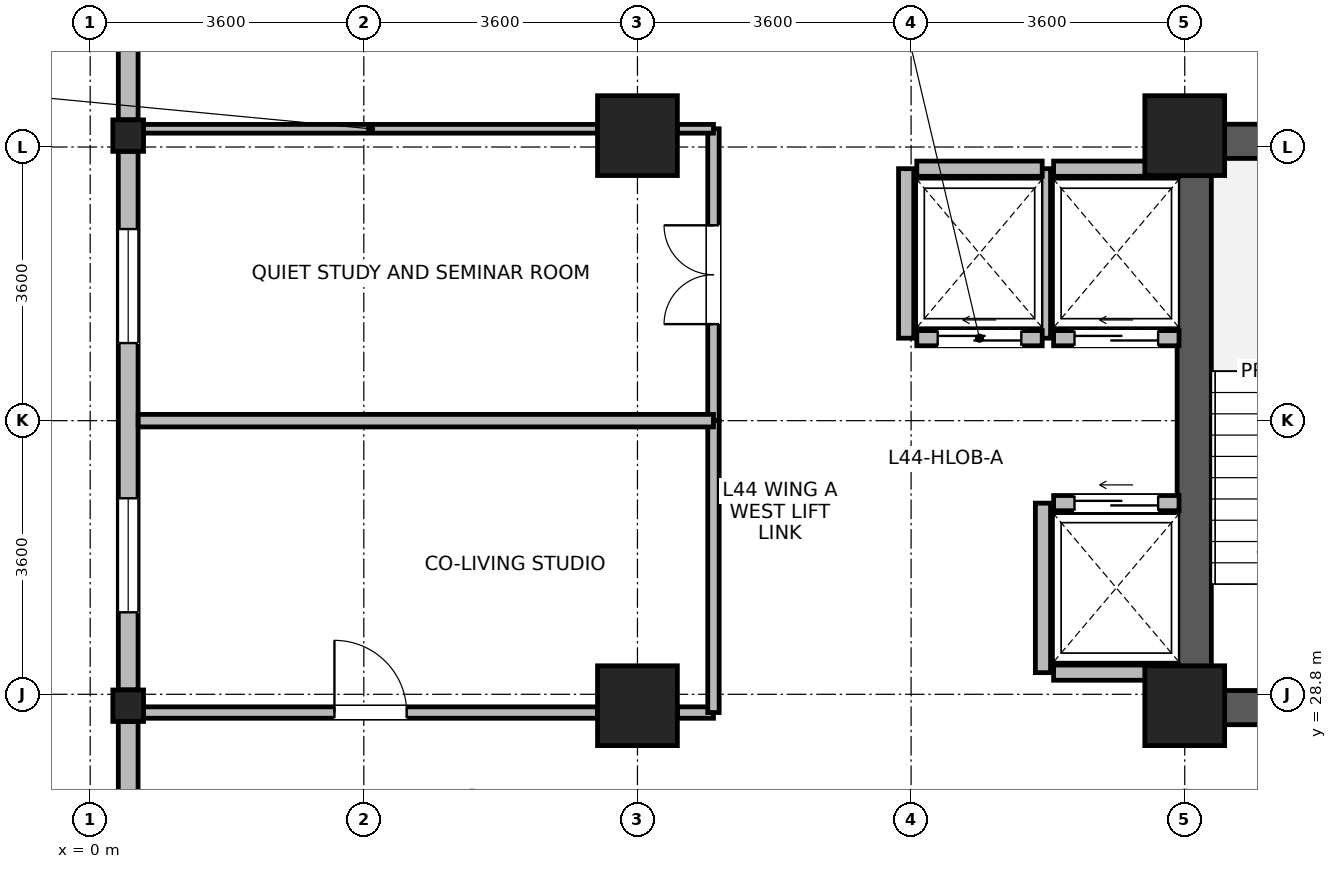
"""IFC4 building model, lengths in metres.
Left out: names, types, materials, properties, quantities, classifications, styles, units other than length and angle.
Written with IfcOpenShell. Run it as: python <this file> out.ifc"""

import sys

from ifc_helpers import new_model, si_unit, direction, frame, frame_2d, origin, origin_2d, place, context, subcontext, project, spatial, rectangle, i_section, extrude, source, transform, mapped, element, fill, save


model = new_model("IFC4")
c1 = context("Model", 3, precision=1e-05, world=origin(), true_north=direction((0.0, 1.0)))
c2 = subcontext(c1, "Body", "Model", "MODEL_VIEW")
j1 = project(units=[si_unit("LENGTHUNIT", "METRE"), si_unit("PLANEANGLEUNIT", "RADIAN")], contexts=[c1])
p1 = place(None, origin())
s1 = spatial("IfcSite", under=j1, at=p1, CompositionType="ELEMENT")
p2 = place(p1, origin())
s2 = spatial("IfcBuilding", under=s1, at=p2, CompositionType="ELEMENT")
p3 = place(p2, frame((0.0, 0.0, 173.5)))
s3 = spatial("IfcBuildingStorey", under=s2, at=p3, CompositionType="ELEMENT", Elevation=173.5)
p4 = place(p3, frame((14.525, 28.4, 0.0), z_axis=(0.0, 0.0, 1.0), x_axis=(0.0, 1.0, 0.0)))
e1 = element("IfcWall", 1, at=p4, inside=s3, PredefinedType="SHEAR", context=c2, shape_type="SweptSolid", body=[
    extrude(rectangle(XDim=7.9, YDim=0.45, at=frame_2d((3.95, 0.0))), origin(), (0.0, 0.0, 1.0), 3.46),
])
for number, where, z_axis, x_axis in (
    (2, (14.75, 28.625, 0.0), (0.0, 0.0, 1.0), (1.0, 0.0, 0.0)),
    (3, (14.75, 36.075, 0.0), (0.0, 0.0, 1.0), (1.0, 0.0, 0.0)),
):
    element("IfcWall", number, at=place(p3, frame(where, z_axis=z_axis, x_axis=x_axis)), inside=s3, PredefinedType="SHEAR", context=c2, shape_type="SweptSolid", body=[
        extrude(rectangle(XDim=3.2, YDim=0.45, at=frame_2d((1.6, 0.0))), origin(), (0.0, 0.0, 1.0), 3.46),
    ])
m1 = source(origin(), c2, "Body", "SweptSolid", [
    extrude(rectangle(XDim=1.05, YDim=1.05, at=origin_2d()), origin(), (0.0, 0.0, 1.0), 3.7),
])
for number, where, z_axis, x_axis in (
    (4, (7.2, 28.65, 0.0), (0.0, 0.0, 1.0), (1.0, 0.0, 0.0)),
    (5, (7.2, 36.15, 0.0), (0.0, 0.0, 1.0), (1.0, 0.0, 0.0)),
    (6, (14.4, 28.65, 0.0), (0.0, 0.0, 1.0), (1.0, 0.0, 0.0)),
    (7, (14.4, 36.15, 0.0), (0.0, 0.0, 1.0), (1.0, 0.0, 0.0)),
):
    element("IfcColumn", number, at=place(p3, frame(where, z_axis=z_axis, x_axis=x_axis)), inside=s3, PredefinedType="COLUMN", context=c2, shape_type="MappedRepresentation", body=[
        mapped(m1, transform((0.0, 0.0, 0.0), x_axis=(1.0, 0.0, 0.0), y_axis=(0.0, 1.0, 0.0), z_axis=(0.0, 0.0, 1.0), scale=1.0)),
    ])
m2 = source(origin(), c2, "Body", "SweptSolid", [
    extrude(i_section(OverallWidth=0.404, OverallDepth=0.414, WebThickness=0.021, FlangeThickness=0.028, FilletRadius=0.015, at=origin_2d()), origin(), (0.0, 0.0, 1.0), 3.7),
])
for number, where, z_axis, x_axis in (
    (8, (0.5, 28.65, 0.0), (0.0, 0.0, 1.0), (1.0, 0.0, 0.0)),
    (9, (0.5, 36.15, 0.0), (0.0, 0.0, 1.0), (1.0, 0.0, 0.0)),
):
    element("IfcColumn", number, at=place(p3, frame(where, z_axis=z_axis, x_axis=x_axis)), inside=s3, PredefinedType="COLUMN", context=c2, shape_type="MappedRepresentation", body=[
        mapped(m2, transform((0.0, 0.0, 0.0), x_axis=(1.0, 0.0, 0.0), y_axis=(0.0, 1.0, 0.0), z_axis=(0.0, 0.0, 1.0), scale=1.0)),
    ])
p5 = place(p3, frame((0.5, 36.358, 0.0), z_axis=(0.0, 0.0, 1.0), x_axis=(0.0, 1.0, 0.0)))
e10 = element("IfcWall", 10, at=p5, inside=s3, PredefinedType="STANDARD", context=c2, shape_type="SweptSolid", body=[
    extrude(rectangle(XDim=3.372, YDim=0.26, at=frame_2d((1.686, 0.0))), origin(), (0.0, 0.0, 1.0), 3.44),
])
p6 = place(p5, frame((0.936, 0.0, 0.85)))
e11 = element("IfcOpeningElement", 11, at=p6, cuts=e10, PredefinedType="OPENING", context=c2, shape_type="SweptSolid", body=[
    extrude(rectangle(XDim=1.5, YDim=1.85, at=frame_2d((0.75, 0.925))), frame((0.0, 0.14, 0.0), z_axis=(0.0, -1.0, 0.0), x_axis=(1.0, 0.0, 0.0)), (0.0, 0.0, 1.0), 0.28),
])
p7 = place(p3, frame((0.5, 28.858, 0.0), z_axis=(0.0, 0.0, 1.0), x_axis=(0.0, 1.0, 0.0)))
e12 = element("IfcWall", 12, at=p7, inside=s3, PredefinedType="STANDARD", context=c2, shape_type="SweptSolid", body=[
    extrude(rectangle(XDim=7.084, YDim=0.26, at=frame_2d((3.542, 0.0))), origin(), (0.0, 0.0, 1.0), 2.99),
])
p8 = place(p7, frame((1.021, 0.0, 0.85)))
e13 = element("IfcOpeningElement", 13, at=p8, cuts=e12, PredefinedType="OPENING", context=c2, shape_type="SweptSolid", body=[
    extrude(rectangle(XDim=1.5, YDim=1.85, at=frame_2d((0.75, 0.925))), frame((0.0, 0.14, 0.0), z_axis=(0.0, -1.0, 0.0), x_axis=(1.0, 0.0, 0.0)), (0.0, 0.0, 1.0), 0.28),
])
p9 = place(p7, frame((4.563, 0.0, 0.85)))
e14 = element("IfcOpeningElement", 14, at=p9, cuts=e12, PredefinedType="OPENING", context=c2, shape_type="SweptSolid", body=[
    extrude(rectangle(XDim=1.5, YDim=1.85, at=frame_2d((0.75, 0.925))), frame((0.0, 0.14, 0.0), z_axis=(0.0, -1.0, 0.0), x_axis=(1.0, 0.0, 0.0)), (0.0, 0.0, 1.0), 0.28),
])
p10 = place(p3, frame((0.5, 21.47, 0.0), z_axis=(0.0, 0.0, 1.0), x_axis=(0.0, 1.0, 0.0)))
e15 = element("IfcWall", 15, at=p10, inside=s3, PredefinedType="STANDARD", context=c2, shape_type="SweptSolid", body=[
    extrude(rectangle(XDim=6.972, YDim=0.26, at=frame_2d((3.486, 0.0))), origin(), (0.0, 0.0, 1.0), 3.44),
])
p11 = place(p10, frame((0.993, 0.0, 0.85)))
e16 = element("IfcOpeningElement", 16, at=p11, cuts=e15, PredefinedType="OPENING", context=c2, shape_type="SweptSolid", body=[
    extrude(rectangle(XDim=1.5, YDim=1.85, at=frame_2d((0.75, 0.925))), frame((0.0, 0.14, 0.0), z_axis=(0.0, -1.0, 0.0), x_axis=(1.0, 0.0, 0.0)), (0.0, 0.0, 1.0), 0.28),
])
p12 = place(p10, frame((3.011, 0.0, 0.85)))
e17 = element("IfcOpeningElement", 17, at=p12, cuts=e15, PredefinedType="OPENING", context=c2, shape_type="SweptSolid", body=[
    extrude(rectangle(XDim=0.95, YDim=1.75, at=frame_2d((0.475, 0.875))), frame((0.0, 0.14, 0.0), z_axis=(0.0, -1.0, 0.0), x_axis=(1.0, 0.0, 0.0)), (0.0, 0.0, 1.0), 0.28),
])
p13 = place(p3, frame((12.675, 33.485, 0.0), z_axis=(0.0, 0.0, 1.0), x_axis=(1.0, 0.0, 0.0)))
e18 = element("IfcWall", 18, at=p13, inside=s3, PredefinedType="PARTITIONING", context=c2, shape_type="SweptSolid", body=[
    extrude(rectangle(XDim=1.65, YDim=0.2, at=frame_2d((0.825, 0.0))), origin(), (0.0, 0.0, 1.0), 3.44),
])
p14 = place(p13, frame((0.275, 0.0, 0.0)))
e19 = element("IfcOpeningElement", 19, at=p14, cuts=e18, PredefinedType="OPENING", context=c2, shape_type="SweptSolid", body=[
    extrude(rectangle(XDim=1.1, YDim=2.12, at=frame_2d((0.55, 1.06))), frame((0.0, 0.11, 0.0), z_axis=(0.0, -1.0, 0.0), x_axis=(1.0, 0.0, 0.0)), (0.0, 0.0, 1.0), 0.22),
])
p15 = place(p3, frame((12.675, 35.715, 0.0), z_axis=(0.0, 0.0, 1.0), x_axis=(1.0, 0.0, 0.0)))
e20 = element("IfcWall", 20, at=p15, inside=s3, PredefinedType="PARTITIONING", context=c2, shape_type="SweptSolid", body=[
    extrude(rectangle(XDim=1.65, YDim=0.2, at=frame_2d((0.825, 0.0))), origin(), (0.0, 0.0, 1.0), 3.44),
])
p16 = place(p3, frame((12.535, 33.485, 0.0), z_axis=(0.0, 0.0, 1.0), x_axis=(0.0, 1.0, 0.0)))
e21 = element("IfcWall", 21, at=p16, inside=s3, PredefinedType="PARTITIONING", context=c2, shape_type="SweptSolid", body=[
    extrude(rectangle(XDim=2.23, YDim=0.2, at=frame_2d((1.115, 0.0))), origin(), (0.0, 0.0, 1.0), 3.44),
])
p17 = place(p3, frame((12.675, 29.085, 0.0), z_axis=(0.0, 0.0, 1.0), x_axis=(1.0, 0.0, 0.0)))
e22 = element("IfcWall", 22, at=p17, inside=s3, PredefinedType="PARTITIONING", context=c2, shape_type="SweptSolid", body=[
    extrude(rectangle(XDim=1.65, YDim=0.2, at=frame_2d((0.825, 0.0))), origin(), (0.0, 0.0, 1.0), 3.44),
])
p18 = place(p3, frame((12.675, 31.315, 0.0), z_axis=(0.0, 0.0, 1.0), x_axis=(1.0, 0.0, 0.0)))
e23 = element("IfcWall", 23, at=p18, inside=s3, PredefinedType="PARTITIONING", context=c2, shape_type="SweptSolid", body=[
    extrude(rectangle(XDim=1.65, YDim=0.2, at=frame_2d((0.825, 0.0))), origin(), (0.0, 0.0, 1.0), 3.44),
])
p19 = place(p18, frame((0.275, 0.0, 0.0)))
e24 = element("IfcOpeningElement", 24, at=p19, cuts=e23, PredefinedType="OPENING", context=c2, shape_type="SweptSolid", body=[
    extrude(rectangle(XDim=1.1, YDim=2.12, at=frame_2d((0.55, 1.06))), frame((0.0, 0.11, 0.0), z_axis=(0.0, -1.0, 0.0), x_axis=(1.0, 0.0, 0.0)), (0.0, 0.0, 1.0), 0.22),
])
p20 = place(p3, frame((12.535, 29.085, 0.0), z_axis=(0.0, 0.0, 1.0), x_axis=(0.0, 1.0, 0.0)))
e25 = element("IfcWall", 25, at=p20, inside=s3, PredefinedType="PARTITIONING", context=c2, shape_type="SweptSolid", body=[
    extrude(rectangle(XDim=2.23, YDim=0.2, at=frame_2d((1.115, 0.0))), origin(), (0.0, 0.0, 1.0), 3.44),
])
p21 = place(p3, frame((10.875, 33.485, 0.0), z_axis=(0.0, 0.0, 1.0), x_axis=(1.0, 0.0, 0.0)))
e26 = element("IfcWall", 26, at=p21, inside=s3, PredefinedType="PARTITIONING", context=c2, shape_type="SweptSolid", body=[
    extrude(rectangle(XDim=1.65, YDim=0.2, at=frame_2d((0.825, 0.0))), origin(), (0.0, 0.0, 1.0), 3.44),
])
p22 = place(p21, frame((0.275, 0.0, 0.0)))
e27 = element("IfcOpeningElement", 27, at=p22, cuts=e26, PredefinedType="OPENING", context=c2, shape_type="SweptSolid", body=[
    extrude(rectangle(XDim=1.1, YDim=2.12, at=frame_2d((0.55, 1.06))), frame((0.0, 0.11, 0.0), z_axis=(0.0, -1.0, 0.0), x_axis=(1.0, 0.0, 0.0)), (0.0, 0.0, 1.0), 0.22),
])
p23 = place(p3, frame((10.875, 35.715, 0.0), z_axis=(0.0, 0.0, 1.0), x_axis=(1.0, 0.0, 0.0)))
e28 = element("IfcWall", 28, at=p23, inside=s3, PredefinedType="PARTITIONING", context=c2, shape_type="SweptSolid", body=[
    extrude(rectangle(XDim=1.65, YDim=0.2, at=frame_2d((0.825, 0.0))), origin(), (0.0, 0.0, 1.0), 3.44),
])
p24 = place(p3, frame((10.735, 33.485, 0.0), z_axis=(0.0, 0.0, 1.0), x_axis=(0.0, 1.0, 0.0)))
e29 = element("IfcWall", 29, at=p24, inside=s3, PredefinedType="PARTITIONING", context=c2, shape_type="SweptSolid", body=[
    extrude(rectangle(XDim=2.23, YDim=0.2, at=frame_2d((1.115, 0.0))), origin(), (0.0, 0.0, 1.0), 3.44),
])
p25 = place(p3, frame((0.702, 28.56, 0.0), z_axis=(0.0, 0.0, 1.0), x_axis=(1.0, 0.0, 0.0)))
e30 = element("IfcWall", 30, at=p25, inside=s3, PredefinedType="PARTITIONING", context=c2, shape_type="SweptSolid", body=[
    extrude(rectangle(XDim=5.973, YDim=0.15, at=frame_2d((2.987, 0.0))), origin(), (0.0, 0.0, 1.0), 2.84),
])
p26 = place(p25, frame((2.511, 0.0, 0.0)))
e31 = element("IfcOpeningElement", 31, at=p26, cuts=e30, PredefinedType="OPENING", context=c2, shape_type="SweptSolid", body=[
    extrude(rectangle(XDim=0.95, YDim=2.1, at=frame_2d((0.475, 1.05))), frame((0.0, 0.085, 0.0), z_axis=(0.0, -1.0, 0.0), x_axis=(1.0, 0.0, 0.0)), (0.0, 0.0, 1.0), 0.17),
])
p27 = place(p3, frame((7.725, 28.56, 0.0), z_axis=(0.0, 0.0, 1.0), x_axis=(1.0, 0.0, 0.0)))
e32 = element("IfcWall", 32, at=p27, inside=s3, PredefinedType="PARTITIONING", context=c2, shape_type="SweptSolid", body=[
    extrude(rectangle(XDim=0.475, YDim=0.15, at=frame_2d((0.237, 0.0))), origin(), (0.0, 0.0, 1.0), 2.84),
])
p28 = place(p3, frame((8.2, 32.4, 0.0), z_axis=(0.0, 0.0, 1.0), x_axis=(0.0, 1.0, 0.0)))
e33 = element("IfcWall", 33, at=p28, inside=s3, PredefinedType="PARTITIONING", context=c2, shape_type="SweptSolid", body=[
    extrude(rectangle(XDim=3.84, YDim=0.15, at=frame_2d((1.92, 0.0))), origin(), (0.0, 0.0, 1.0), 3.44),
])
p29 = place(p28, frame((1.27, 0.0, 0.0)))
e34 = element("IfcOpeningElement", 34, at=p29, cuts=e33, PredefinedType="OPENING", context=c2, shape_type="SweptSolid", body=[
    extrude(rectangle(XDim=1.3, YDim=2.12, at=frame_2d((0.65, 1.06))), frame((0.0, 0.085, 0.0), z_axis=(0.0, -1.0, 0.0), x_axis=(1.0, 0.0, 0.0)), (0.0, 0.0, 1.0), 0.17),
])
p30 = place(p3, frame((8.2, 28.56, 0.0), z_axis=(0.0, 0.0, 1.0), x_axis=(0.0, 1.0, 0.0)))
e35 = element("IfcWall", 35, at=p30, inside=s3, PredefinedType="PARTITIONING", context=c2, shape_type="SweptSolid", body=[
    extrude(rectangle(XDim=3.84, YDim=0.15, at=frame_2d((1.92, 0.0))), origin(), (0.0, 0.0, 1.0), 3.44),
])
p31 = place(p3, frame((0.632, 32.4, 0.0), z_axis=(0.0, 0.0, 1.0), x_axis=(1.0, 0.0, 0.0)))
e36 = element("IfcWall", 36, at=p31, inside=s3, PredefinedType="PARTITIONING", context=c2, shape_type="SweptSolid", body=[
    extrude(rectangle(XDim=7.568, YDim=0.165, at=frame_2d((3.784, 0.0))), origin(), (0.0, 0.0, 1.0), 3.44),
])
p32 = place(p3, frame((0.702, 36.24, 0.0), z_axis=(0.0, 0.0, 1.0), x_axis=(1.0, 0.0, 0.0)))
e37 = element("IfcWall", 37, at=p32, inside=s3, PredefinedType="PARTITIONING", context=c2, shape_type="SweptSolid", body=[
    extrude(rectangle(XDim=5.973, YDim=0.115, at=frame_2d((2.987, 0.0))), origin(), (0.0, 0.0, 1.0), 2.84),
])
p33 = place(p3, frame((7.725, 36.24, 0.0), z_axis=(0.0, 0.0, 1.0), x_axis=(1.0, 0.0, 0.0)))
e38 = element("IfcWall", 38, at=p33, inside=s3, PredefinedType="PARTITIONING", context=c2, shape_type="SweptSolid", body=[
    extrude(rectangle(XDim=0.475, YDim=0.115, at=frame_2d((0.237, 0.0))), origin(), (0.0, 0.0, 1.0), 2.84),
])
p34 = place(p8, origin())
e39 = element("IfcWindow", 39, at=p34, inside=s3, PartitioningType="SINGLE_PANEL", PredefinedType="WINDOW", context=c2, shape_type="SweptSolid", body=[
    extrude(rectangle(XDim=1.5, YDim=1.85, at=frame_2d((0.75, 0.925))), frame((0.0, 0.03, 0.0), z_axis=(0.0, -1.0, 0.0), x_axis=(1.0, 0.0, 0.0)), (0.0, 0.0, 1.0), 0.06),
])
fill(e13, e39)
p35 = place(p9, origin())
e40 = element("IfcWindow", 40, at=p35, inside=s3, PartitioningType="SINGLE_PANEL", PredefinedType="WINDOW", context=c2, shape_type="SweptSolid", body=[
    extrude(rectangle(XDim=1.5, YDim=1.85, at=frame_2d((0.75, 0.925))), frame((0.0, 0.03, 0.0), z_axis=(0.0, -1.0, 0.0), x_axis=(1.0, 0.0, 0.0)), (0.0, 0.0, 1.0), 0.06),
])
fill(e14, e40)
p36 = place(p14, origin())
e41 = element("IfcDoor", 41, at=p36, inside=s3, OperationType="SLIDING_TO_LEFT", PredefinedType="DOOR", context=c2, shape_type="SweptSolid", body=[
    extrude(rectangle(XDim=1.1, YDim=2.12, at=frame_2d((0.55, 1.06))), frame((0.0, 0.025, 0.0), z_axis=(0.0, -1.0, 0.0), x_axis=(1.0, 0.0, 0.0)), (0.0, 0.0, 1.0), 0.05),
])
fill(e19, e41)
p37 = place(p19, origin())
e42 = element("IfcDoor", 42, at=p37, inside=s3, OperationType="SLIDING_TO_LEFT", PredefinedType="DOOR", context=c2, shape_type="SweptSolid", body=[
    extrude(rectangle(XDim=1.1, YDim=2.12, at=frame_2d((0.55, 1.06))), frame((0.0, 0.025, 0.0), z_axis=(0.0, -1.0, 0.0), x_axis=(1.0, 0.0, 0.0)), (0.0, 0.0, 1.0), 0.05),
])
fill(e24, e42)
p38 = place(p22, origin())
e43 = element("IfcDoor", 43, at=p38, inside=s3, OperationType="SLIDING_TO_LEFT", PredefinedType="DOOR", context=c2, shape_type="SweptSolid", body=[
    extrude(rectangle(XDim=1.1, YDim=2.12, at=frame_2d((0.55, 1.06))), frame((0.0, 0.025, 0.0), z_axis=(0.0, -1.0, 0.0), x_axis=(1.0, 0.0, 0.0)), (0.0, 0.0, 1.0), 0.05),
])
fill(e27, e43)
p39 = place(p26, origin())
e44 = element("IfcDoor", 44, at=p39, inside=s3, OperationType="SINGLE_SWING_LEFT", PredefinedType="DOOR", context=c2, shape_type="SweptSolid", body=[
    extrude(rectangle(XDim=0.95, YDim=2.1, at=frame_2d((0.475, 1.05))), frame((0.0, 0.025, 0.0), z_axis=(0.0, -1.0, 0.0), x_axis=(1.0, 0.0, 0.0)), (0.0, 0.0, 1.0), 0.05),
])
fill(e31, e44)
p40 = place(p29, origin())
e45 = element("IfcDoor", 45, at=p40, inside=s3, OperationType="DOUBLE_DOOR_SINGLE_SWING", PredefinedType="DOOR", context=c2, shape_type="SweptSolid", body=[
    extrude(rectangle(XDim=1.3, YDim=2.12, at=frame_2d((0.65, 1.06))), frame((0.0, 0.025, 0.0), z_axis=(0.0, -1.0, 0.0), x_axis=(1.0, 0.0, 0.0)), (0.0, 0.0, 1.0), 0.05),
])
fill(e34, e45)
save(model, sys.argv[1])
